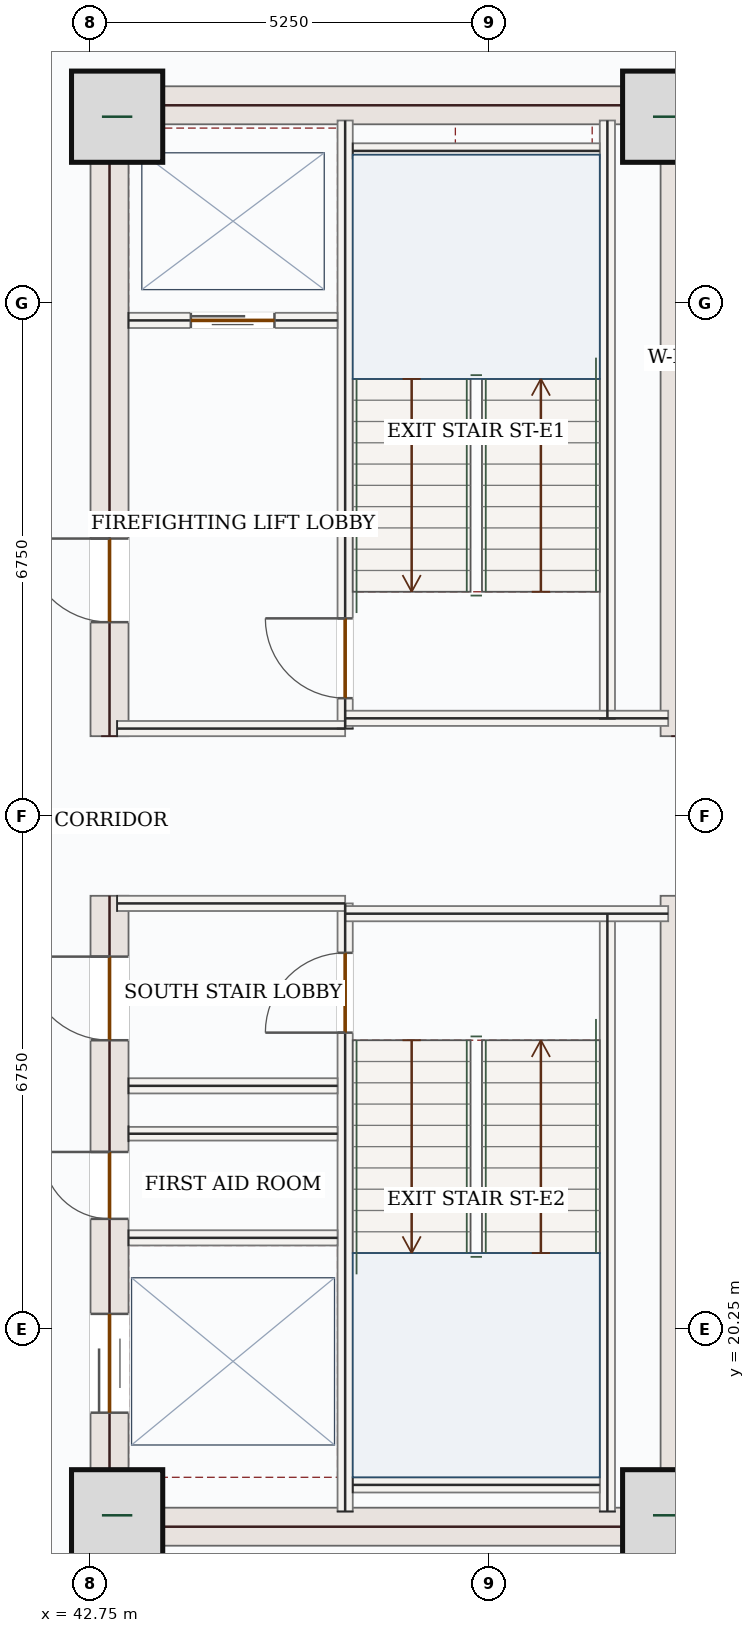
"""IFC4 building model, lengths in metres.
Left out: names, types, materials, properties, quantities, classifications, styles, units other than length and angle.
Written with IfcOpenShell. Run it as: python <this file> out.ifc"""

import sys

from ifc_helpers import new_model, si_unit, direction, frame, frame_2d, origin, origin_2d, place, context, subcontext, project, spatial, rectangle, extrude, source, transform, mapped, element, fill, save


model = new_model("IFC4")
c1 = context("Model", 3, precision=1e-05, world=origin(), true_north=direction((0.0, 1.0)))
c2 = subcontext(c1, "Body", "Model", "MODEL_VIEW")
j1 = project(units=[si_unit("LENGTHUNIT", "METRE"), si_unit("PLANEANGLEUNIT", "RADIAN")], contexts=[c1])
p1 = place(None, origin())
s1 = spatial("IfcSite", under=j1, at=p1, CompositionType="ELEMENT")
p2 = place(p1, origin())
s2 = spatial("IfcBuilding", under=s1, at=p2, CompositionType="ELEMENT")
p3 = place(p2, frame((0.0, 0.0, 209.7)))
s3 = spatial("IfcBuildingStorey", under=s2, at=p3, CompositionType="ELEMENT", Elevation=209.7)
p4 = place(p3, frame((43.0, 17.4, 0.0), z_axis=(0.0, 0.0, 1.0), x_axis=(0.0, 1.0, 0.0)))
e1 = element("IfcWall", 1, at=p4, inside=s3, PredefinedType="SHEAR", context=c2, shape_type="SweptSolid", body=[
    extrude(rectangle(XDim=8.55, YDim=0.5, at=frame_2d((4.275, 0.0))), origin(), (0.0, 0.0, 1.0), 3.62),
])
p5 = place(p4, frame((6.65, 0.0, 0.0)))
e2 = element("IfcOpeningElement", 2, at=p5, cuts=e1, PredefinedType="OPENING", context=c2, shape_type="SweptSolid", body=[
    extrude(rectangle(XDim=1.1, YDim=2.2, at=frame_2d((0.55, 1.1))), frame((0.0, 0.26, 0.0), z_axis=(0.0, -1.0, 0.0), x_axis=(1.0, 0.0, 0.0)), (0.0, 0.0, 1.0), 0.52),
])
p6 = place(p4, frame((1.75, 0.0, 0.0)))
e3 = element("IfcOpeningElement", 3, at=p6, cuts=e1, PredefinedType="OPENING", context=c2, shape_type="SweptSolid", body=[
    extrude(rectangle(XDim=1.3, YDim=2.2, at=frame_2d((0.65, 1.1))), frame((0.0, 0.26, 0.0), z_axis=(0.0, -1.0, 0.0), x_axis=(1.0, 0.0, 0.0)), (0.0, 0.0, 1.0), 0.52),
])
p7 = place(p4, frame((4.3, 0.0, 0.0)))
e4 = element("IfcOpeningElement", 4, at=p7, cuts=e1, PredefinedType="OPENING", context=c2, shape_type="SweptSolid", body=[
    extrude(rectangle(XDim=0.88, YDim=2.1, at=frame_2d((0.44, 1.05))), frame((0.0, 0.26, 0.0), z_axis=(0.0, -1.0, 0.0), x_axis=(1.0, 0.0, 0.0)), (0.0, 0.0, 1.0), 0.52),
])
p8 = place(p3, frame((43.0, 28.05, 0.0), z_axis=(0.0, 0.0, 1.0), x_axis=(0.0, 1.0, 0.0)))
e5 = element("IfcWall", 5, at=p8, inside=s3, PredefinedType="SHEAR", context=c2, shape_type="SweptSolid", body=[
    extrude(rectangle(XDim=8.55, YDim=0.5, at=frame_2d((4.275, 0.0))), origin(), (0.0, 0.0, 1.0), 3.62),
])
p9 = place(p8, frame((1.5, 0.0, 0.0)))
e6 = element("IfcOpeningElement", 6, at=p9, cuts=e5, PredefinedType="OPENING", context=c2, shape_type="SweptSolid", body=[
    extrude(rectangle(XDim=1.1, YDim=2.2, at=frame_2d((0.55, 1.1))), frame((0.0, 0.26, 0.0), z_axis=(0.0, -1.0, 0.0), x_axis=(1.0, 0.0, 0.0)), (0.0, 0.0, 1.0), 0.52),
])
m1 = source(origin(), c2, "Body", "SweptSolid", [
    extrude(rectangle(XDim=8.55, YDim=0.5, at=frame_2d((4.275, 0.0))), origin(), (0.0, 0.0, 1.0), 3.62),
])
for number, where, z_axis, x_axis in (
    (7, (50.5, 17.4, 0.0), (0.0, 0.0, 1.0), (0.0, 1.0, 0.0)),
    (8, (50.5, 28.05, 0.0), (0.0, 0.0, 1.0), (0.0, 1.0, 0.0)),
):
    element("IfcWall", number, at=place(p3, frame(where, z_axis=z_axis, x_axis=x_axis)), inside=s3, PredefinedType="SHEAR", context=c2, shape_type="MappedRepresentation", body=[
        mapped(m1, transform((0.0, 0.0, 0.0), x_axis=(1.0, 0.0, 0.0), y_axis=(0.0, 1.0, 0.0), z_axis=(0.0, 0.0, 1.0), scale=1.0)),
    ])
m2 = source(origin(), c2, "Body", "SweptSolid", [
    extrude(rectangle(XDim=7.0, YDim=0.5, at=frame_2d((3.5, 0.0))), origin(), (0.0, 0.0, 1.0), 3.62),
])
for number, where, z_axis, x_axis in (
    (9, (43.25, 17.65, 0.0), (0.0, 0.0, 1.0), (1.0, 0.0, 0.0)),
    (10, (43.25, 36.35, 0.0), (0.0, 0.0, 1.0), (1.0, 0.0, 0.0)),
):
    element("IfcWall", number, at=place(p3, frame(where, z_axis=z_axis, x_axis=x_axis)), inside=s3, PredefinedType="SHEAR", context=c2, shape_type="MappedRepresentation", body=[
        mapped(m2, transform((0.0, 0.0, 0.0), x_axis=(1.0, 0.0, 0.0), y_axis=(0.0, 1.0, 0.0), z_axis=(0.0, 0.0, 1.0), scale=1.0)),
    ])
m3 = source(origin(), c2, "Body", "SweptSolid", [
    extrude(rectangle(XDim=1.2, YDim=1.2, at=origin_2d()), origin(), (0.0, 0.0, 1.0), 3.9),
])
for number, where, z_axis, x_axis in (
    (11, (43.1, 17.8, 0.0), (0.0, 0.0, 1.0), (1.0, 0.0, 0.0)),
    (12, (50.35, 17.8, 0.0), (0.0, 0.0, 1.0), (1.0, 0.0, 0.0)),
    (13, (43.1, 36.2, 0.0), (0.0, 0.0, 1.0), (1.0, 0.0, 0.0)),
    (14, (50.35, 36.2, 0.0), (0.0, 0.0, 1.0), (1.0, 0.0, 0.0)),
):
    element("IfcColumn", number, at=place(p3, frame(where, z_axis=z_axis, x_axis=x_axis)), inside=s3, PredefinedType="COLUMN", context=c2, shape_type="MappedRepresentation", body=[
        mapped(m3, transform((0.0, 0.0, 0.0), x_axis=(1.0, 0.0, 0.0), y_axis=(0.0, 1.0, 0.0), z_axis=(0.0, 0.0, 1.0), scale=1.0)),
    ])
m4 = source(origin(), c2, "Body", "SweptSolid", [
    extrude(rectangle(XDim=5.258, YDim=0.28, at=frame_2d((2.629, 0.0))), origin(), (0.0, 0.0, 1.0), 3.62),
])
p10 = place(p3, frame((53.06, 18.458, 0.0), z_axis=(0.0, 0.0, 1.0), x_axis=(-0.707106781187, -0.707106781187, 0.0)))
e15 = element("IfcWall", 15, at=p10, inside=s3, PredefinedType="SOLIDWALL", context=c2, shape_type="MappedRepresentation", body=[
    mapped(m4, transform((0.0, 0.0, 0.0), x_axis=(1.0, 0.0, 0.0), y_axis=(0.0, 1.0, 0.0), z_axis=(0.0, 0.0, 1.0), scale=1.0)),
])
m5 = source(origin(), c2, "Body", "SweptSolid", [
    extrude(rectangle(XDim=7.87, YDim=0.2, at=frame_2d((3.935, 0.0))), origin(), (0.0, 0.0, 1.0), 3.62),
])
for number, where, z_axis, x_axis in (
    (16, (49.55, 17.85, 0.0), (0.0, 0.0, 1.0), (0.0, 1.0, 0.0)),
    (17, (49.55, 28.28, 0.0), (0.0, 0.0, 1.0), (0.0, 1.0, 0.0)),
):
    element("IfcWall", number, at=place(p3, frame(where, z_axis=z_axis, x_axis=x_axis)), inside=s3, PredefinedType="SOLIDWALL", context=c2, shape_type="MappedRepresentation", body=[
        mapped(m5, transform((0.0, 0.0, 0.0), x_axis=(1.0, 0.0, 0.0), y_axis=(0.0, 1.0, 0.0), z_axis=(0.0, 0.0, 1.0), scale=1.0)),
    ])
p11 = place(p3, frame((46.1, 17.85, 0.0), z_axis=(0.0, 0.0, 1.0), x_axis=(0.0, 1.0, 0.0)))
e18 = element("IfcWall", 18, at=p11, inside=s3, PredefinedType="SOLIDWALL", context=c2, shape_type="SweptSolid", body=[
    extrude(rectangle(XDim=8.0, YDim=0.2, at=frame_2d((4.0, 0.0))), origin(), (0.0, 0.0, 1.0), 3.62),
])
p12 = place(p11, frame((6.3, 0.0, 0.0)))
e19 = element("IfcOpeningElement", 19, at=p12, cuts=e18, PredefinedType="OPENING", context=c2, shape_type="SweptSolid", body=[
    extrude(rectangle(XDim=1.05, YDim=2.15, at=frame_2d((0.525, 1.075))), frame((0.0, 0.11, 0.0), z_axis=(0.0, -1.0, 0.0), x_axis=(1.0, 0.0, 0.0)), (0.0, 0.0, 1.0), 0.22),
])
p13 = place(p3, frame((46.1, 28.15, 0.0), z_axis=(0.0, 0.0, 1.0), x_axis=(0.0, 1.0, 0.0)))
e20 = element("IfcWall", 20, at=p13, inside=s3, PredefinedType="SOLIDWALL", context=c2, shape_type="SweptSolid", body=[
    extrude(rectangle(XDim=8.0, YDim=0.2, at=frame_2d((4.0, 0.0))), origin(), (0.0, 0.0, 1.0), 3.62),
])
p14 = place(p13, frame((0.4, 0.0, 0.0)))
e21 = element("IfcOpeningElement", 21, at=p14, cuts=e20, PredefinedType="OPENING", context=c2, shape_type="SweptSolid", body=[
    extrude(rectangle(XDim=1.05, YDim=2.15, at=frame_2d((0.525, 1.075))), frame((0.0, 0.11, 0.0), z_axis=(0.0, -1.0, 0.0), x_axis=(1.0, 0.0, 0.0)), (0.0, 0.0, 1.0), 0.22),
])
m6 = source(origin(), c2, "Body", "SweptSolid", [
    extrude(rectangle(XDim=3.0, YDim=0.2, at=frame_2d((1.5, 0.0))), origin(), (0.0, 0.0, 1.0), 3.62),
])
p15 = place(p3, frame((43.1, 25.85, 0.0), z_axis=(0.0, 0.0, 1.0), x_axis=(1.0, 0.0, 0.0)))
e22 = element("IfcWall", 22, at=p15, inside=s3, PredefinedType="SOLIDWALL", context=c2, shape_type="MappedRepresentation", body=[
    mapped(m6, transform((0.0, 0.0, 0.0), x_axis=(1.0, 0.0, 0.0), y_axis=(0.0, 1.0, 0.0), z_axis=(0.0, 0.0, 1.0), scale=1.0)),
])
m7 = source(origin(), c2, "Body", "SweptSolid", [
    extrude(rectangle(XDim=4.25, YDim=0.2, at=frame_2d((2.125, 0.0))), origin(), (0.0, 0.0, 1.0), 3.62),
])
p16 = place(p3, frame((46.1, 25.715, 0.0), z_axis=(0.0, 0.0, 1.0), x_axis=(1.0, 0.0, 0.0)))
e23 = element("IfcWall", 23, at=p16, inside=s3, PredefinedType="SOLIDWALL", context=c2, shape_type="MappedRepresentation", body=[
    mapped(m7, transform((0.0, 0.0, 0.0), x_axis=(1.0, 0.0, 0.0), y_axis=(0.0, 1.0, 0.0), z_axis=(0.0, 0.0, 1.0), scale=1.0)),
])
p17 = place(p3, frame((43.1, 28.15, 0.0), z_axis=(0.0, 0.0, 1.0), x_axis=(1.0, 0.0, 0.0)))
e24 = element("IfcWall", 24, at=p17, inside=s3, PredefinedType="SOLIDWALL", context=c2, shape_type="MappedRepresentation", body=[
    mapped(m6, transform((0.0, 0.0, 0.0), x_axis=(1.0, 0.0, 0.0), y_axis=(0.0, 1.0, 0.0), z_axis=(0.0, 0.0, 1.0), scale=1.0)),
])
p18 = place(p3, frame((46.1, 28.285, 0.0), z_axis=(0.0, 0.0, 1.0), x_axis=(1.0, 0.0, 0.0)))
e25 = element("IfcWall", 25, at=p18, inside=s3, PredefinedType="SOLIDWALL", context=c2, shape_type="MappedRepresentation", body=[
    mapped(m7, transform((0.0, 0.0, 0.0), x_axis=(1.0, 0.0, 0.0), y_axis=(0.0, 1.0, 0.0), z_axis=(0.0, 0.0, 1.0), scale=1.0)),
])
m8 = source(origin(), c2, "Body", "SweptSolid", [
    extrude(rectangle(XDim=3.25, YDim=0.2, at=frame_2d((1.625, 0.0))), origin(), (0.0, 0.0, 1.0), 3.62),
])
for number, where, z_axis, x_axis in (
    (26, (46.2, 35.75, 0.0), (0.0, 0.0, 1.0), (1.0, 0.0, 0.0)),
    (27, (46.2, 18.2, 0.0), (0.0, 0.0, 1.0), (1.0, 0.0, 0.0)),
):
    element("IfcWall", number, at=place(p3, frame(where, z_axis=z_axis, x_axis=x_axis)), inside=s3, PredefinedType="SOLIDWALL", context=c2, shape_type="MappedRepresentation", body=[
        mapped(m8, transform((0.0, 0.0, 0.0), x_axis=(1.0, 0.0, 0.0), y_axis=(0.0, 1.0, 0.0), z_axis=(0.0, 0.0, 1.0), scale=1.0)),
    ])
p19 = place(p3, frame((43.25, 33.52, 0.0), z_axis=(0.0, 0.0, 1.0), x_axis=(1.0, 0.0, 0.0)))
e28 = element("IfcWall", 28, at=p19, inside=s3, PredefinedType="SOLIDWALL", context=c2, shape_type="SweptSolid", body=[
    extrude(rectangle(XDim=2.75, YDim=0.2, at=frame_2d((1.375, 0.0))), origin(), (0.0, 0.0, 1.0), 3.62),
])
p20 = place(p19, frame((0.82, 0.0, 0.0)))
e29 = element("IfcOpeningElement", 29, at=p20, cuts=e28, PredefinedType="OPENING", context=c2, shape_type="SweptSolid", body=[
    extrude(rectangle(XDim=1.1, YDim=2.15, at=frame_2d((0.55, 1.075))), frame((0.0, 0.11, 0.0), z_axis=(0.0, -1.0, 0.0), x_axis=(1.0, 0.0, 0.0)), (0.0, 0.0, 1.0), 0.22),
])
m9 = source(origin(), c2, "Body", "SweptSolid", [
    extrude(rectangle(XDim=2.75, YDim=0.2, at=frame_2d((1.375, 0.0))), origin(), (0.0, 0.0, 1.0), 3.62),
])
for number, where, z_axis, x_axis in (
    (30, (43.25, 23.45, 0.0), (0.0, 0.0, 1.0), (1.0, 0.0, 0.0)),
    (31, (43.25, 21.45, 0.0), (0.0, 0.0, 1.0), (1.0, 0.0, 0.0)),
):
    element("IfcWall", number, at=place(p3, frame(where, z_axis=z_axis, x_axis=x_axis)), inside=s3, PredefinedType="SOLIDWALL", context=c2, shape_type="MappedRepresentation", body=[
        mapped(m9, transform((0.0, 0.0, 0.0), x_axis=(1.0, 0.0, 0.0), y_axis=(0.0, 1.0, 0.0), z_axis=(0.0, 0.0, 1.0), scale=1.0)),
    ])
m10 = source(origin(), c2, "Body", "SweptSolid", [
    extrude(rectangle(XDim=2.75, YDim=0.18, at=frame_2d((1.375, 0.0))), origin(), (0.0, 0.0, 1.0), 3.62),
])
p21 = place(p3, frame((43.25, 22.82, 0.0), z_axis=(0.0, 0.0, 1.0), x_axis=(1.0, 0.0, 0.0)))
e32 = element("IfcWall", 32, at=p21, inside=s3, PredefinedType="PARTITIONING", context=c2, shape_type="MappedRepresentation", body=[
    mapped(m10, transform((0.0, 0.0, 0.0), x_axis=(1.0, 0.0, 0.0), y_axis=(0.0, 1.0, 0.0), z_axis=(0.0, 0.0, 1.0), scale=1.0)),
])
m11 = source(origin(), c2, "Body", "SweptSolid", [
    extrude(rectangle(XDim=1.05, YDim=2.15, at=frame_2d((0.525, 1.075))), frame((0.0, 0.025, 0.0), z_axis=(0.0, -1.0, 0.0), x_axis=(1.0, 0.0, 0.0)), (0.0, 0.0, 1.0), 0.05),
])
p22 = place(p14, origin())
e33 = element("IfcDoor", 33, at=p22, inside=s3, OperationType="SINGLE_SWING_RIGHT", PredefinedType="DOOR", context=c2, shape_type="MappedRepresentation", body=[
    mapped(m11, transform((0.0, 0.0, 0.0), x_axis=(1.0, 0.0, 0.0), y_axis=(0.0, 1.0, 0.0), z_axis=(0.0, 0.0, 1.0), scale=1.0)),
])
fill(e21, e33)
p23 = place(p12, origin())
e34 = element("IfcDoor", 34, at=p23, inside=s3, OperationType="SINGLE_SWING_LEFT", PredefinedType="DOOR", context=c2, shape_type="MappedRepresentation", body=[
    mapped(m11, transform((0.0, 0.0, 0.0), x_axis=(1.0, 0.0, 0.0), y_axis=(0.0, 1.0, 0.0), z_axis=(0.0, 0.0, 1.0), scale=1.0)),
])
fill(e19, e34)
m12 = source(origin(), c2, "Body", "SweptSolid", [
    extrude(rectangle(XDim=1.1, YDim=2.15, at=frame_2d((0.55, 1.075))), frame((0.0, 0.025, 0.0), z_axis=(0.0, -1.0, 0.0), x_axis=(1.0, 0.0, 0.0)), (0.0, 0.0, 1.0), 0.05),
])
p24 = place(p20, origin())
e35 = element("IfcDoor", 35, at=p24, inside=s3, OperationType="DOUBLE_DOOR_SLIDING", PredefinedType="DOOR", context=c2, shape_type="MappedRepresentation", body=[
    mapped(m12, transform((0.0, 0.0, 0.0), x_axis=(1.0, 0.0, 0.0), y_axis=(0.0, 1.0, 0.0), z_axis=(0.0, 0.0, 1.0), scale=1.0)),
])
fill(e29, e35)
m13 = source(origin(), c2, "Body", "SweptSolid", [
    extrude(rectangle(XDim=1.1, YDim=2.2, at=frame_2d((0.55, 1.1))), frame((0.0, 0.025, 0.0), z_axis=(0.0, -1.0, 0.0), x_axis=(1.0, 0.0, 0.0)), (0.0, 0.0, 1.0), 0.05),
])
p25 = place(p9, origin())
e36 = element("IfcDoor", 36, at=p25, inside=s3, OperationType="SINGLE_SWING_RIGHT", PredefinedType="DOOR", context=c2, shape_type="MappedRepresentation", body=[
    mapped(m13, transform((0.0, 0.0, 0.0), x_axis=(1.0, 0.0, 0.0), y_axis=(0.0, 1.0, 0.0), z_axis=(0.0, 0.0, 1.0), scale=1.0)),
])
fill(e6, e36)
p26 = place(p5, origin())
e37 = element("IfcDoor", 37, at=p26, inside=s3, OperationType="SINGLE_SWING_RIGHT", PredefinedType="DOOR", context=c2, shape_type="MappedRepresentation", body=[
    mapped(m13, transform((0.0, 0.0, 0.0), x_axis=(1.0, 0.0, 0.0), y_axis=(0.0, 1.0, 0.0), z_axis=(0.0, 0.0, 1.0), scale=1.0)),
])
fill(e2, e37)
m14 = source(origin(), c2, "Body", "SweptSolid", [
    extrude(rectangle(XDim=1.3, YDim=2.2, at=frame_2d((0.65, 1.1))), frame((0.0, 0.025, 0.0), z_axis=(0.0, -1.0, 0.0), x_axis=(1.0, 0.0, 0.0)), (0.0, 0.0, 1.0), 0.05),
])
p27 = place(p6, origin())
e38 = element("IfcDoor", 38, at=p27, inside=s3, OperationType="DOUBLE_DOOR_SLIDING", PredefinedType="DOOR", context=c2, shape_type="MappedRepresentation", body=[
    mapped(m14, transform((0.0, 0.0, 0.0), x_axis=(1.0, 0.0, 0.0), y_axis=(0.0, 1.0, 0.0), z_axis=(0.0, 0.0, 1.0), scale=1.0)),
])
fill(e3, e38)
m15 = source(origin(), c2, "Body", "SweptSolid", [
    extrude(rectangle(XDim=0.88, YDim=2.1, at=frame_2d((0.44, 1.05))), frame((0.0, 0.025, 0.0), z_axis=(0.0, -1.0, 0.0), x_axis=(1.0, 0.0, 0.0)), (0.0, 0.0, 1.0), 0.05),
])
p28 = place(p7, origin())
e39 = element("IfcDoor", 39, at=p28, inside=s3, OperationType="SINGLE_SWING_RIGHT", PredefinedType="DOOR", context=c2, shape_type="MappedRepresentation", body=[
    mapped(m15, transform((0.0, 0.0, 0.0), x_axis=(1.0, 0.0, 0.0), y_axis=(0.0, 1.0, 0.0), z_axis=(0.0, 0.0, 1.0), scale=1.0)),
])
fill(e4, e39)
save(model, sys.argv[1])
